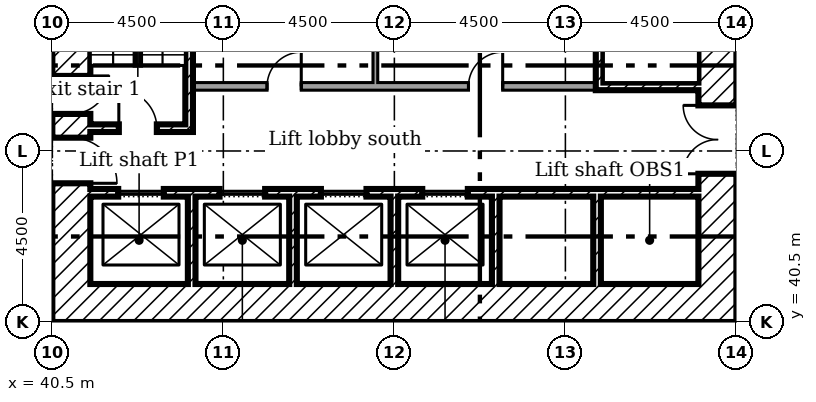
"""IFC4 building model, lengths in metres.
Left out: names, types, materials, properties, quantities, classifications, styles, units other than length and angle.
Written with IfcOpenShell. Run it as: python <this file> out.ifc"""

import sys

from ifc_helpers import new_model, si_unit, direction, frame, frame_2d, origin, place, context, subcontext, project, spatial, rectangle, extrude, element, fill, save


model = new_model("IFC4")
c1 = context("Model", 3, precision=1e-05, world=origin(), true_north=direction((0.0, 1.0)))
c2 = subcontext(c1, "Body", "Model", "MODEL_VIEW")
j1 = project(units=[si_unit("LENGTHUNIT", "METRE"), si_unit("PLANEANGLEUNIT", "RADIAN")], contexts=[c1])
p1 = place(None, origin())
s1 = spatial("IfcSite", under=j1, at=p1, CompositionType="ELEMENT")
p2 = place(p1, origin())
s2 = spatial("IfcBuilding", under=s1, at=p2, CompositionType="ELEMENT")
p3 = place(p2, frame((0.0, 0.0, 16.5)))
s3 = spatial("IfcBuildingStorey", under=s2, at=p3, CompositionType="ELEMENT", Elevation=16.5)
p4 = place(p3, frame((58.0, 40.5, 0.0), z_axis=(0.0, 0.0, 1.0), x_axis=(0.0, 1.0, 0.0)))
e1 = element("IfcWall", 1, at=p4, inside=s3, PredefinedType="SHEAR", context=c2, shape_type="SweptSolid", body=[
    extrude(rectangle(XDim=18.0, YDim=1.0, at=frame_2d((9.0, 0.0))), origin(), (0.0, 0.0, 1.0), 4.0),
])
p5 = place(p4, frame((13.15, 0.0, 0.0)))
e2 = element("IfcOpeningElement", 2, at=p5, cuts=e1, PredefinedType="OPENING", context=c2, shape_type="SweptSolid", body=[
    extrude(rectangle(XDim=1.2, YDim=2.1, at=frame_2d((0.6, 1.05))), frame((0.0, 0.51, 0.0), z_axis=(0.0, -1.0, 0.0), x_axis=(1.0, 0.0, 0.0)), (0.0, 0.0, 1.0), 1.02),
])
p6 = place(p4, frame((3.9, 0.0, 0.0)))
e3 = element("IfcOpeningElement", 3, at=p6, cuts=e1, PredefinedType="OPENING", context=c2, shape_type="SweptSolid", body=[
    extrude(rectangle(XDim=1.8, YDim=2.1, at=frame_2d((0.9, 1.05))), frame((0.0, 0.51, 0.0), z_axis=(0.0, -1.0, 0.0), x_axis=(1.0, 0.0, 0.0)), (0.0, 0.0, 1.0), 1.02),
])
p7 = place(p4, frame((11.525, 0.0, 0.0)))
e4 = element("IfcOpeningElement", 4, at=p7, cuts=e1, PredefinedType="OPENING", context=c2, shape_type="SweptSolid", body=[
    extrude(rectangle(XDim=1.0, YDim=2.1, at=frame_2d((0.5, 1.05))), frame((0.0, 0.51, 0.0), z_axis=(0.0, -1.0, 0.0), x_axis=(1.0, 0.0, 0.0)), (0.0, 0.0, 1.0), 1.02),
])
p8 = place(p3, frame((41.5, 41.0, 0.0)))
e5 = element("IfcWall", 5, at=p8, inside=s3, PredefinedType="SHEAR", context=c2, shape_type="SweptSolid", body=[
    extrude(rectangle(XDim=16.0, YDim=1.0, at=frame_2d((8.0, 0.0))), origin(), (0.0, 0.0, 1.0), 4.0),
])
p9 = place(p3, frame((41.0, 40.5, 0.0), z_axis=(0.0, 0.0, 1.0), x_axis=(0.0, 1.0, 0.0)))
e6 = element("IfcWall", 6, at=p9, inside=s3, PredefinedType="SHEAR", context=c2, shape_type="SweptSolid", body=[
    extrude(rectangle(XDim=18.0, YDim=1.0, at=frame_2d((9.0, 0.0))), origin(), (0.0, 0.0, 1.0), 4.0),
])
p10 = place(p9, frame((3.65, 0.0, 0.0)))
e7 = element("IfcOpeningElement", 7, at=p10, cuts=e6, PredefinedType="OPENING", context=c2, shape_type="SweptSolid", body=[
    extrude(rectangle(XDim=1.2, YDim=2.1, at=frame_2d((0.6, 1.05))), frame((0.0, 0.51, 0.0), z_axis=(0.0, -1.0, 0.0), x_axis=(1.0, 0.0, 0.0)), (0.0, 0.0, 1.0), 1.02),
])
p11 = place(p9, frame((5.475, 0.0, 0.0)))
e8 = element("IfcOpeningElement", 8, at=p11, cuts=e6, PredefinedType="OPENING", context=c2, shape_type="SweptSolid", body=[
    extrude(rectangle(XDim=1.0, YDim=2.1, at=frame_2d((0.5, 1.05))), frame((0.0, 0.51, 0.0), z_axis=(0.0, -1.0, 0.0), x_axis=(1.0, 0.0, 0.0)), (0.0, 0.0, 1.0), 1.02),
])
p12 = place(p9, frame((12.3, 0.0, 0.0)))
e9 = element("IfcOpeningElement", 9, at=p12, cuts=e6, PredefinedType="OPENING", context=c2, shape_type="SweptSolid", body=[
    extrude(rectangle(XDim=1.0, YDim=2.1, at=frame_2d((0.5, 1.05))), frame((0.0, 0.51, 0.0), z_axis=(0.0, -1.0, 0.0), x_axis=(1.0, 0.0, 0.0)), (0.0, 0.0, 1.0), 1.02),
])
for number, where, z_axis, x_axis in (
    (10, (44.167, 41.5, 0.0), (0.0, 0.0, 1.0), (0.0, 1.0, 0.0)),
    (11, (46.833, 41.5, 0.0), (0.0, 0.0, 1.0), (0.0, 1.0, 0.0)),
    (12, (49.5, 41.5, 0.0), (0.0, 0.0, 1.0), (0.0, 1.0, 0.0)),
    (13, (52.167, 41.5, 0.0), (0.0, 0.0, 1.0), (0.0, 1.0, 0.0)),
    (14, (54.833, 41.5, 0.0), (0.0, 0.0, 1.0), (0.0, 1.0, 0.0)),
):
    element("IfcWall", number, at=place(p3, frame(where, z_axis=z_axis, x_axis=x_axis)), inside=s3, PredefinedType="SHEAR", context=c2, shape_type="SweptSolid", body=[
        extrude(rectangle(XDim=2.3, YDim=0.2, at=frame_2d((1.15, 0.0))), origin(), (0.0, 0.0, 1.0), 4.0),
    ])
p13 = place(p3, frame((41.5, 43.9, 0.0)))
e15 = element("IfcWall", 15, at=p13, inside=s3, PredefinedType="SHEAR", context=c2, shape_type="SweptSolid", body=[
    extrude(rectangle(XDim=16.0, YDim=0.2, at=frame_2d((8.0, 0.0))), origin(), (0.0, 0.0, 1.0), 4.0),
])
p14 = place(p13, frame((0.733, 0.0, 0.0)))
e16 = element("IfcOpeningElement", 16, at=p14, cuts=e15, PredefinedType="OPENING", context=c2, shape_type="SweptSolid", body=[
    extrude(rectangle(XDim=1.2, YDim=2.1, at=frame_2d((0.6, 1.05))), frame((0.0, 0.11, 0.0), z_axis=(0.0, -1.0, 0.0), x_axis=(1.0, 0.0, 0.0)), (0.0, 0.0, 1.0), 0.22),
])
p15 = place(p13, frame((3.4, 0.0, 0.0)))
e17 = element("IfcOpeningElement", 17, at=p15, cuts=e15, PredefinedType="OPENING", context=c2, shape_type="SweptSolid", body=[
    extrude(rectangle(XDim=1.2, YDim=2.1, at=frame_2d((0.6, 1.05))), frame((0.0, 0.11, 0.0), z_axis=(0.0, -1.0, 0.0), x_axis=(1.0, 0.0, 0.0)), (0.0, 0.0, 1.0), 0.22),
])
p16 = place(p13, frame((6.067, 0.0, 0.0)))
e18 = element("IfcOpeningElement", 18, at=p16, cuts=e15, PredefinedType="OPENING", context=c2, shape_type="SweptSolid", body=[
    extrude(rectangle(XDim=1.2, YDim=2.1, at=frame_2d((0.6, 1.05))), frame((0.0, 0.11, 0.0), z_axis=(0.0, -1.0, 0.0), x_axis=(1.0, 0.0, 0.0)), (0.0, 0.0, 1.0), 0.22),
])
p17 = place(p13, frame((8.733, 0.0, 0.0)))
e19 = element("IfcOpeningElement", 19, at=p17, cuts=e15, PredefinedType="OPENING", context=c2, shape_type="SweptSolid", body=[
    extrude(rectangle(XDim=1.2, YDim=2.1, at=frame_2d((0.6, 1.05))), frame((0.0, 0.11, 0.0), z_axis=(0.0, -1.0, 0.0), x_axis=(1.0, 0.0, 0.0)), (0.0, 0.0, 1.0), 0.22),
])
p18 = place(p3, frame((44.1, 45.5, 0.0), z_axis=(0.0, 0.0, 1.0), x_axis=(0.0, 1.0, 0.0)))
e20 = element("IfcWall", 20, at=p18, inside=s3, PredefinedType="SHEAR", context=c2, shape_type="SweptSolid", body=[
    extrude(rectangle(XDim=6.9, YDim=0.2, at=frame_2d((3.45, 0.0))), origin(), (0.0, 0.0, 1.0), 4.0),
])
p19 = place(p3, frame((41.5, 45.6, 0.0)))
e21 = element("IfcWall", 21, at=p19, inside=s3, PredefinedType="SHEAR", context=c2, shape_type="SweptSolid", body=[
    extrude(rectangle(XDim=2.5, YDim=0.2, at=frame_2d((1.25, 0.0))), origin(), (0.0, 0.0, 1.0), 4.0),
])
p20 = place(p19, frame((0.75, 0.0, 0.0)))
e22 = element("IfcOpeningElement", 22, at=p20, cuts=e21, PredefinedType="OPENING", context=c2, shape_type="SweptSolid", body=[
    extrude(rectangle(XDim=1.0, YDim=2.1, at=frame_2d((0.5, 1.05))), frame((0.0, 0.11, 0.0), z_axis=(0.0, -1.0, 0.0), x_axis=(1.0, 0.0, 0.0)), (0.0, 0.0, 1.0), 0.22),
])
p21 = place(p3, frame((54.8, 46.7, 0.0)))
e23 = element("IfcWall", 23, at=p21, inside=s3, PredefinedType="SHEAR", context=c2, shape_type="SweptSolid", body=[
    extrude(rectangle(XDim=2.7, YDim=0.2, at=frame_2d((1.35, 0.0))), origin(), (0.0, 0.0, 1.0), 4.0),
])
p22 = place(p3, frame((54.9, 46.8, 0.0), z_axis=(0.0, 0.0, 1.0), x_axis=(0.0, 1.0, 0.0)))
e24 = element("IfcWall", 24, at=p22, inside=s3, PredefinedType="SHEAR", context=c2, shape_type="SweptSolid", body=[
    extrude(rectangle(XDim=6.5, YDim=0.2, at=frame_2d((3.25, 0.0))), origin(), (0.0, 0.0, 1.0), 4.0),
])
p23 = place(p3, frame((44.2, 46.7, 0.0)))
e25 = element("IfcWall", 25, at=p23, inside=s3, PredefinedType="PARTITIONING", context=c2, shape_type="SweptSolid", body=[
    extrude(rectangle(XDim=10.6, YDim=0.2, at=frame_2d((5.3, 0.0))), origin(), (0.0, 0.0, 1.0), 4.0),
])
p24 = place(p23, frame((1.95, 0.0, 0.0)))
e26 = element("IfcOpeningElement", 26, at=p24, cuts=e25, PredefinedType="OPENING", context=c2, shape_type="SweptSolid", body=[
    extrude(rectangle(XDim=0.9, YDim=2.1, at=frame_2d((0.45, 1.05))), frame((0.0, 0.11, 0.0), z_axis=(0.0, -1.0, 0.0), x_axis=(1.0, 0.0, 0.0)), (0.0, 0.0, 1.0), 0.22),
])
p25 = place(p23, frame((7.25, 0.0, 0.0)))
e27 = element("IfcOpeningElement", 27, at=p25, cuts=e25, PredefinedType="OPENING", context=c2, shape_type="SweptSolid", body=[
    extrude(rectangle(XDim=0.9, YDim=2.1, at=frame_2d((0.45, 1.05))), frame((0.0, 0.11, 0.0), z_axis=(0.0, -1.0, 0.0), x_axis=(1.0, 0.0, 0.0)), (0.0, 0.0, 1.0), 0.22),
])
p26 = place(p3, frame((49.0, 46.8, 0.0), z_axis=(0.0, 0.0, 1.0), x_axis=(0.0, 1.0, 0.0)))
e28 = element("IfcWall", 28, at=p26, inside=s3, PredefinedType="PARTITIONING", context=c2, shape_type="SweptSolid", body=[
    extrude(rectangle(XDim=2.363, YDim=0.125, at=frame_2d((1.181, 0.0))), origin(), (0.0, 0.0, 1.0), 4.0),
])
p27 = place(p6, origin())
e29 = element("IfcDoor", 29, at=p27, inside=s3, OperationType="DOUBLE_DOOR_SINGLE_SWING", PredefinedType="DOOR", context=c2, shape_type="SweptSolid", body=[
    extrude(rectangle(XDim=1.8, YDim=2.1, at=frame_2d((0.9, 1.05))), frame((0.0, 0.025, 0.0), z_axis=(0.0, -1.0, 0.0), x_axis=(1.0, 0.0, 0.0)), (0.0, 0.0, 1.0), 0.05),
])
fill(e3, e29)
p28 = place(p10, frame((1.2, 0.0, 0.0), x_axis=(-1.0, 0.0, 0.0)))
e30 = element("IfcDoor", 30, at=p28, inside=s3, OperationType="SINGLE_SWING_LEFT", PredefinedType="DOOR", context=c2, shape_type="SweptSolid", body=[
    extrude(rectangle(XDim=1.2, YDim=2.1, at=frame_2d((0.6, 1.05))), frame((0.0, 0.025, 0.0), z_axis=(0.0, -1.0, 0.0), x_axis=(1.0, 0.0, 0.0)), (0.0, 0.0, 1.0), 0.05),
])
fill(e7, e30)
p29 = place(p20, origin())
e31 = element("IfcDoor", 31, at=p29, inside=s3, OperationType="SINGLE_SWING_RIGHT", PredefinedType="DOOR", context=c2, shape_type="SweptSolid", body=[
    extrude(rectangle(XDim=1.0, YDim=2.1, at=frame_2d((0.5, 1.05))), frame((0.0, 0.025, 0.0), z_axis=(0.0, -1.0, 0.0), x_axis=(1.0, 0.0, 0.0)), (0.0, 0.0, 1.0), 0.05),
])
fill(e22, e31)
p30 = place(p11, frame((1.0, 0.0, 0.0), x_axis=(-1.0, 0.0, 0.0)))
e32 = element("IfcDoor", 32, at=p30, inside=s3, OperationType="SINGLE_SWING_RIGHT", PredefinedType="DOOR", context=c2, shape_type="SweptSolid", body=[
    extrude(rectangle(XDim=1.0, YDim=2.1, at=frame_2d((0.5, 1.05))), frame((0.0, 0.025, 0.0), z_axis=(0.0, -1.0, 0.0), x_axis=(1.0, 0.0, 0.0)), (0.0, 0.0, 1.0), 0.05),
])
fill(e8, e32)
p31 = place(p24, origin())
e33 = element("IfcDoor", 33, at=p31, inside=s3, OperationType="SINGLE_SWING_LEFT", PredefinedType="DOOR", context=c2, shape_type="SweptSolid", body=[
    extrude(rectangle(XDim=0.9, YDim=2.1, at=frame_2d((0.45, 1.05))), frame((0.0, 0.025, 0.0), z_axis=(0.0, -1.0, 0.0), x_axis=(1.0, 0.0, 0.0)), (0.0, 0.0, 1.0), 0.05),
])
fill(e26, e33)
p32 = place(p25, origin())
e34 = element("IfcDoor", 34, at=p32, inside=s3, OperationType="SINGLE_SWING_LEFT", PredefinedType="DOOR", context=c2, shape_type="SweptSolid", body=[
    extrude(rectangle(XDim=0.9, YDim=2.1, at=frame_2d((0.45, 1.05))), frame((0.0, 0.025, 0.0), z_axis=(0.0, -1.0, 0.0), x_axis=(1.0, 0.0, 0.0)), (0.0, 0.0, 1.0), 0.05),
])
fill(e27, e34)
p33 = place(p14, origin())
e35 = element("IfcDoor", 35, at=p33, inside=s3, OperationType="SLIDING_TO_LEFT", PredefinedType="DOOR", context=c2, shape_type="SweptSolid", body=[
    extrude(rectangle(XDim=1.2, YDim=2.1, at=frame_2d((0.6, 1.05))), frame((0.0, 0.025, 0.0), z_axis=(0.0, -1.0, 0.0), x_axis=(1.0, 0.0, 0.0)), (0.0, 0.0, 1.0), 0.05),
])
fill(e16, e35)
p34 = place(p15, origin())
e36 = element("IfcDoor", 36, at=p34, inside=s3, OperationType="SLIDING_TO_LEFT", PredefinedType="DOOR", context=c2, shape_type="SweptSolid", body=[
    extrude(rectangle(XDim=1.2, YDim=2.1, at=frame_2d((0.6, 1.05))), frame((0.0, 0.025, 0.0), z_axis=(0.0, -1.0, 0.0), x_axis=(1.0, 0.0, 0.0)), (0.0, 0.0, 1.0), 0.05),
])
fill(e17, e36)
p35 = place(p16, origin())
e37 = element("IfcDoor", 37, at=p35, inside=s3, OperationType="SLIDING_TO_LEFT", PredefinedType="DOOR", context=c2, shape_type="SweptSolid", body=[
    extrude(rectangle(XDim=1.2, YDim=2.1, at=frame_2d((0.6, 1.05))), frame((0.0, 0.025, 0.0), z_axis=(0.0, -1.0, 0.0), x_axis=(1.0, 0.0, 0.0)), (0.0, 0.0, 1.0), 0.05),
])
fill(e18, e37)
p36 = place(p17, origin())
e38 = element("IfcDoor", 38, at=p36, inside=s3, OperationType="SLIDING_TO_LEFT", PredefinedType="DOOR", context=c2, shape_type="SweptSolid", body=[
    extrude(rectangle(XDim=1.2, YDim=2.1, at=frame_2d((0.6, 1.05))), frame((0.0, 0.025, 0.0), z_axis=(0.0, -1.0, 0.0), x_axis=(1.0, 0.0, 0.0)), (0.0, 0.0, 1.0), 0.05),
])
fill(e19, e38)
save(model, sys.argv[1])
